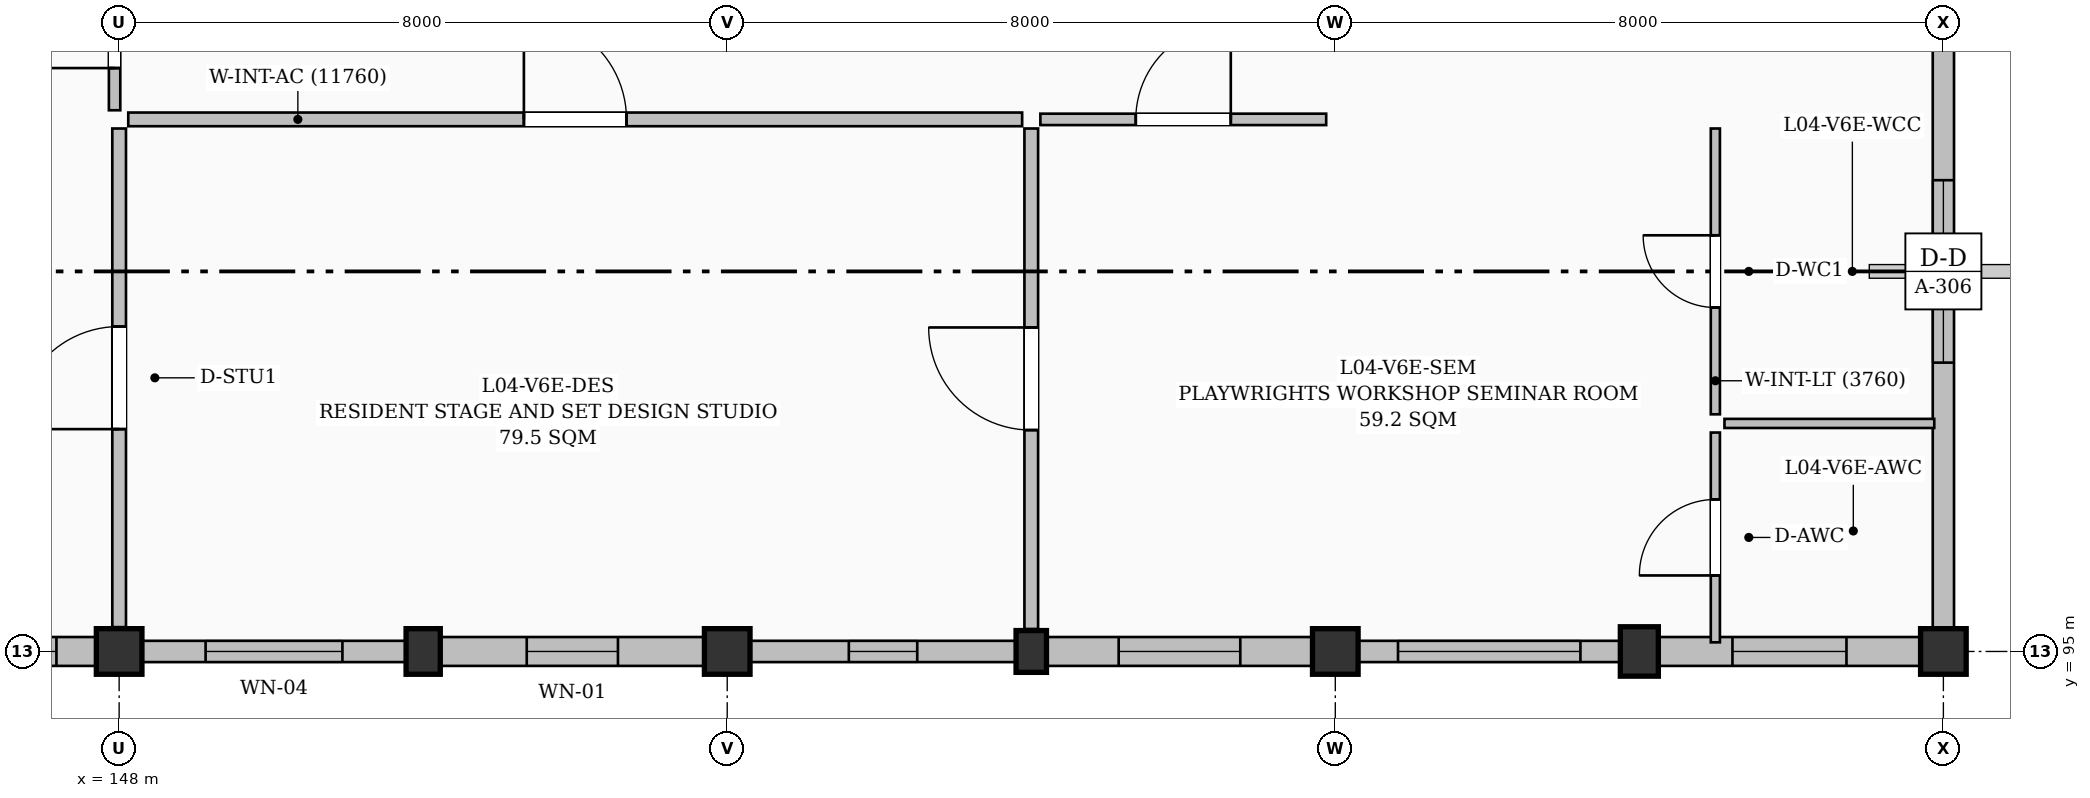
"""IFC4 building model, lengths in metres.
Left out: names, types, materials, properties, quantities, classifications, styles, units other than length and angle.
Written with IfcOpenShell. Run it as: python <this file> out.ifc"""

import sys

from ifc_helpers import new_model, si_unit, direction, frame, frame_2d, origin, origin_2d, place, context, subcontext, project, spatial, rectangle, extrude, element, fill, save


model = new_model("IFC4")
c1 = context("Model", 3, precision=1e-05, world=origin(), true_north=direction((0.0, 1.0)))
c2 = subcontext(c1, "Body", "Model", "MODEL_VIEW")
j1 = project(units=[si_unit("LENGTHUNIT", "METRE"), si_unit("PLANEANGLEUNIT", "RADIAN")], contexts=[c1])
p1 = place(None, origin())
s1 = spatial("IfcSite", under=j1, at=p1, CompositionType="ELEMENT")
p2 = place(p1, origin())
s2 = spatial("IfcBuilding", under=s1, at=p2, CompositionType="ELEMENT")
p3 = place(p2, frame((0.0, 0.0, 18.3)))
s3 = spatial("IfcBuildingStorey", under=s2, at=p3, CompositionType="ELEMENT", Elevation=18.3)
p4 = place(p3, frame((148.0, 95.0, 0.0), z_axis=(0.0, 0.0, 1.0), x_axis=(1.0, 0.0, 0.0)))
e1 = element("IfcColumn", 1, at=p4, inside=s3, PredefinedType="COLUMN", context=c2, shape_type="SweptSolid", body=[
    extrude(rectangle(XDim=0.6, YDim=0.6, at=origin_2d()), origin(), (0.0, 0.0, 1.0), 4.5),
])
p5 = place(p3, frame((152.0, 95.0, 0.0), z_axis=(0.0, 0.0, 1.0), x_axis=(1.0, 0.0, 0.0)))
e2 = element("IfcColumn", 2, at=p5, inside=s3, PredefinedType="PILASTER", context=c2, shape_type="SweptSolid", body=[
    extrude(rectangle(XDim=0.45, YDim=0.6, at=origin_2d()), origin(), (0.0, 0.0, 1.0), 4.5),
])
p6 = place(p3, frame((156.0, 95.0, 0.0), z_axis=(0.0, 0.0, 1.0), x_axis=(1.0, 0.0, 0.0)))
e3 = element("IfcColumn", 3, at=p6, inside=s3, PredefinedType="COLUMN", context=c2, shape_type="SweptSolid", body=[
    extrude(rectangle(XDim=0.6, YDim=0.6, at=origin_2d()), origin(), (0.0, 0.0, 1.0), 4.5),
])
p7 = place(p3, frame((160.0, 95.0, 0.0), z_axis=(0.0, 0.0, 1.0), x_axis=(1.0, 0.0, 0.0)))
e4 = element("IfcColumn", 4, at=p7, inside=s3, PredefinedType="PILASTER", context=c2, shape_type="SweptSolid", body=[
    extrude(rectangle(XDim=0.4, YDim=0.55, at=origin_2d()), origin(), (0.0, 0.0, 1.0), 4.5),
])
p8 = place(p3, frame((164.0, 95.0, 0.0), z_axis=(0.0, 0.0, 1.0), x_axis=(1.0, 0.0, 0.0)))
e5 = element("IfcColumn", 5, at=p8, inside=s3, PredefinedType="COLUMN", context=c2, shape_type="SweptSolid", body=[
    extrude(rectangle(XDim=0.6, YDim=0.6, at=origin_2d()), origin(), (0.0, 0.0, 1.0), 4.5),
])
p9 = place(p3, frame((168.0, 95.0, 0.0), z_axis=(0.0, 0.0, 1.0), x_axis=(1.0, 0.0, 0.0)))
e6 = element("IfcColumn", 6, at=p9, inside=s3, PredefinedType="PILASTER", context=c2, shape_type="SweptSolid", body=[
    extrude(rectangle(XDim=0.5, YDim=0.65, at=origin_2d()), origin(), (0.0, 0.0, 1.0), 4.5),
])
p10 = place(p3, frame((172.0, 95.0, 0.0), z_axis=(0.0, 0.0, 1.0), x_axis=(1.0, 0.0, 0.0)))
e7 = element("IfcColumn", 7, at=p10, inside=s3, PredefinedType="COLUMN", context=c2, shape_type="SweptSolid", body=[
    extrude(rectangle(XDim=0.6, YDim=0.6, at=origin_2d()), origin(), (0.0, 0.0, 1.0), 4.5),
])
p11 = place(p3, frame((172.0, 104.7, 0.0), z_axis=(0.0, 0.0, 1.0), x_axis=(0.0, -1.0, 0.0)))
e8 = element("IfcWall", 8, at=p11, inside=s3, PredefinedType="SOLIDWALL", context=c2, shape_type="SweptSolid", body=[
    extrude(rectangle(XDim=9.4, YDim=0.28, at=frame_2d((4.7, 0.0))), origin(), (0.0, 0.0, 1.0), 3.885),
])
p12 = place(p11, frame((3.5, 0.0, 0.95)))
e9 = element("IfcOpeningElement", 9, at=p12, cuts=e8, PredefinedType="OPENING", context=c2, shape_type="SweptSolid", body=[
    extrude(rectangle(XDim=2.4, YDim=1.5, at=frame_2d((1.2, 0.75))), frame((0.0, 0.15, 0.0), z_axis=(0.0, -1.0, 0.0), x_axis=(1.0, 0.0, 0.0)), (0.0, 0.0, 1.0), 0.3),
])
p13 = place(p3, frame((171.7, 95.0, 0.0), z_axis=(0.0, 0.0, 1.0), x_axis=(-1.0, 0.0, 0.0)))
e10 = element("IfcWall", 10, at=p13, inside=s3, PredefinedType="SOLIDWALL", context=c2, shape_type="SweptSolid", body=[
    extrude(rectangle(XDim=3.45, YDim=0.38, at=frame_2d((1.725, 0.0))), origin(), (0.0, 0.0, 1.0), 3.635),
])
p14 = place(p13, frame((0.975, 0.0, 0.95)))
e11 = element("IfcOpeningElement", 11, at=p14, cuts=e10, PredefinedType="OPENING", context=c2, shape_type="SweptSolid", body=[
    extrude(rectangle(XDim=1.5, YDim=1.5, at=frame_2d((0.75, 0.75))), frame((0.0, 0.2, 0.0), z_axis=(0.0, -1.0, 0.0), x_axis=(1.0, 0.0, 0.0)), (0.0, 0.0, 1.0), 0.4),
])
p15 = place(p3, frame((167.75, 95.0, 0.0), z_axis=(0.0, 0.0, 1.0), x_axis=(-1.0, 0.0, 0.0)))
e12 = element("IfcWall", 12, at=p15, inside=s3, PredefinedType="SOLIDWALL", context=c2, shape_type="SweptSolid", body=[
    extrude(rectangle(XDim=3.45, YDim=0.28, at=frame_2d((1.725, 0.0))), origin(), (0.0, 0.0, 1.0), 3.635),
])
p16 = place(p15, frame((0.525, 0.0, 0.95)))
e13 = element("IfcOpeningElement", 13, at=p16, cuts=e12, PredefinedType="OPENING", context=c2, shape_type="SweptSolid", body=[
    extrude(rectangle(XDim=2.4, YDim=1.5, at=frame_2d((1.2, 0.75))), frame((0.0, 0.15, 0.0), z_axis=(0.0, -1.0, 0.0), x_axis=(1.0, 0.0, 0.0)), (0.0, 0.0, 1.0), 0.3),
])
p17 = place(p3, frame((163.7, 95.0, 0.0), z_axis=(0.0, 0.0, 1.0), x_axis=(-1.0, 0.0, 0.0)))
e14 = element("IfcWall", 14, at=p17, inside=s3, PredefinedType="SOLIDWALL", context=c2, shape_type="SweptSolid", body=[
    extrude(rectangle(XDim=3.5, YDim=0.38, at=frame_2d((1.75, 0.0))), origin(), (0.0, 0.0, 1.0), 3.685),
])
p18 = place(p17, frame((0.95, 0.0, 0.95)))
e15 = element("IfcOpeningElement", 15, at=p18, cuts=e14, PredefinedType="OPENING", context=c2, shape_type="SweptSolid", body=[
    extrude(rectangle(XDim=1.6, YDim=1.2, at=frame_2d((0.8, 0.6))), frame((0.0, 0.2, 0.0), z_axis=(0.0, -1.0, 0.0), x_axis=(1.0, 0.0, 0.0)), (0.0, 0.0, 1.0), 0.4),
])
p19 = place(p3, frame((159.8, 95.0, 0.0), z_axis=(0.0, 0.0, 1.0), x_axis=(-1.0, 0.0, 0.0)))
e16 = element("IfcWall", 16, at=p19, inside=s3, PredefinedType="SOLIDWALL", context=c2, shape_type="SweptSolid", body=[
    extrude(rectangle(XDim=3.5, YDim=0.28, at=frame_2d((1.75, 0.0))), origin(), (0.0, 0.0, 1.0), 3.685),
])
p20 = place(p19, frame((1.3, 0.0, 0.95)))
e17 = element("IfcOpeningElement", 17, at=p20, cuts=e16, PredefinedType="OPENING", context=c2, shape_type="SweptSolid", body=[
    extrude(rectangle(XDim=0.9, YDim=1.8, at=frame_2d((0.45, 0.9))), frame((0.0, 0.15, 0.0), z_axis=(0.0, -1.0, 0.0), x_axis=(1.0, 0.0, 0.0)), (0.0, 0.0, 1.0), 0.3),
])
p21 = place(p3, frame((155.7, 95.0, 0.0), z_axis=(0.0, 0.0, 1.0), x_axis=(-1.0, 0.0, 0.0)))
e18 = element("IfcWall", 18, at=p21, inside=s3, PredefinedType="SOLIDWALL", context=c2, shape_type="SweptSolid", body=[
    extrude(rectangle(XDim=3.475, YDim=0.38, at=frame_2d((1.737, 0.0))), origin(), (0.0, 0.0, 1.0), 3.885),
])
p22 = place(p21, frame((1.137, 0.0, 0.95)))
e19 = element("IfcOpeningElement", 19, at=p22, cuts=e18, PredefinedType="OPENING", context=c2, shape_type="SweptSolid", body=[
    extrude(rectangle(XDim=1.2, YDim=1.8, at=frame_2d((0.6, 0.9))), frame((0.0, 0.2, 0.0), z_axis=(0.0, -1.0, 0.0), x_axis=(1.0, 0.0, 0.0)), (0.0, 0.0, 1.0), 0.4),
])
p23 = place(p3, frame((151.775, 95.0, 0.0), z_axis=(0.0, 0.0, 1.0), x_axis=(-1.0, 0.0, 0.0)))
e20 = element("IfcWall", 20, at=p23, inside=s3, PredefinedType="SOLIDWALL", context=c2, shape_type="SweptSolid", body=[
    extrude(rectangle(XDim=3.475, YDim=0.28, at=frame_2d((1.737, 0.0))), origin(), (0.0, 0.0, 1.0), 3.885),
])
p24 = place(p23, frame((0.837, 0.0, 0.95)))
e21 = element("IfcOpeningElement", 21, at=p24, cuts=e20, PredefinedType="OPENING", context=c2, shape_type="SweptSolid", body=[
    extrude(rectangle(XDim=1.8, YDim=1.8, at=frame_2d((0.9, 0.9))), frame((0.0, 0.15, 0.0), z_axis=(0.0, -1.0, 0.0), x_axis=(1.0, 0.0, 0.0)), (0.0, 0.0, 1.0), 0.3),
])
p25 = place(p3, frame((147.7, 95.0, 0.0), z_axis=(0.0, 0.0, 1.0), x_axis=(-1.0, 0.0, 0.0)))
e22 = element("IfcWall", 22, at=p25, inside=s3, PredefinedType="SOLIDWALL", context=c2, shape_type="SweptSolid", body=[
    extrude(rectangle(XDim=3.45, YDim=0.38, at=frame_2d((1.725, 0.0))), origin(), (0.0, 0.0, 1.0), 3.585),
])
p26 = place(p25, frame((0.525, 0.0, 0.95)))
e23 = element("IfcOpeningElement", 23, at=p26, cuts=e22, PredefinedType="OPENING", context=c2, shape_type="SweptSolid", body=[
    extrude(rectangle(XDim=2.4, YDim=1.8, at=frame_2d((1.2, 0.9))), frame((0.0, 0.2, 0.0), z_axis=(0.0, -1.0, 0.0), x_axis=(1.0, 0.0, 0.0)), (0.0, 0.0, 1.0), 0.4),
])
p27 = place(p3, frame((148.0, 95.32, 0.0), z_axis=(0.0, 0.0, 1.0), x_axis=(0.0, 1.0, 0.0)))
e24 = element("IfcWall", 24, at=p27, inside=s3, PredefinedType="PARTITIONING", context=c2, shape_type="SweptSolid", body=[
    extrude(rectangle(XDim=6.56, YDim=0.18, at=frame_2d((3.28, 0.0))), origin(), (0.0, 0.0, 1.0), 3.335),
])
p28 = place(p27, frame((2.605, 0.0, 0.0)))
e25 = element("IfcOpeningElement", 25, at=p28, cuts=e24, PredefinedType="OPENING", context=c2, shape_type="SweptSolid", body=[
    extrude(rectangle(XDim=1.35, YDim=2.2, at=frame_2d((0.675, 1.1))), frame((0.0, 0.1, 0.0), z_axis=(0.0, -1.0, 0.0), x_axis=(1.0, 0.0, 0.0)), (0.0, 0.0, 1.0), 0.2),
])
p29 = place(p3, frame((147.94, 102.12, 0.0), z_axis=(0.0, 0.0, 1.0), x_axis=(0.0, 1.0, 0.0)))
e26 = element("IfcWall", 26, at=p29, inside=s3, PredefinedType="PARTITIONING", context=c2, shape_type="SweptSolid", body=[
    extrude(rectangle(XDim=2.36, YDim=0.15, at=frame_2d((1.18, 0.0))), origin(), (0.0, 0.0, 1.0), 3.335),
])
p30 = place(p29, frame((0.555, 0.0, 0.0)))
e27 = element("IfcOpeningElement", 27, at=p30, cuts=e26, PredefinedType="OPENING", context=c2, shape_type="SweptSolid", body=[
    extrude(rectangle(XDim=1.25, YDim=2.15, at=frame_2d((0.625, 1.075))), frame((0.0, 0.085, 0.0), z_axis=(0.0, -1.0, 0.0), x_axis=(1.0, 0.0, 0.0)), (0.0, 0.0, 1.0), 0.17),
])
p31 = place(p3, frame((160.0, 95.295, 0.0), z_axis=(0.0, 0.0, 1.0), x_axis=(0.0, 1.0, 0.0)))
e28 = element("IfcWall", 28, at=p31, inside=s3, PredefinedType="PARTITIONING", context=c2, shape_type="SweptSolid", body=[
    extrude(rectangle(XDim=6.585, YDim=0.18, at=frame_2d((3.292, 0.0))), origin(), (0.0, 0.0, 1.0), 4.2),
])
p32 = place(p31, frame((2.617, 0.0, 0.0)))
e29 = element("IfcOpeningElement", 29, at=p32, cuts=e28, PredefinedType="OPENING", context=c2, shape_type="SweptSolid", body=[
    extrude(rectangle(XDim=1.35, YDim=2.2, at=frame_2d((0.675, 1.1))), frame((0.0, 0.1, 0.0), z_axis=(0.0, -1.0, 0.0), x_axis=(1.0, 0.0, 0.0)), (0.0, 0.0, 1.0), 0.2),
])
p33 = place(p3, frame((148.12, 102.0, 0.0), z_axis=(0.0, 0.0, 1.0), x_axis=(1.0, 0.0, 0.0)))
e30 = element("IfcWall", 30, at=p33, inside=s3, PredefinedType="PARTITIONING", context=c2, shape_type="SweptSolid", body=[
    extrude(rectangle(XDim=11.76, YDim=0.18, at=frame_2d((5.88, 0.0))), origin(), (0.0, 0.0, 1.0), 3.785),
])
p34 = place(p33, frame((5.205, 0.0, 0.0)))
e31 = element("IfcOpeningElement", 31, at=p34, cuts=e30, PredefinedType="OPENING", context=c2, shape_type="SweptSolid", body=[
    extrude(rectangle(XDim=1.35, YDim=2.2, at=frame_2d((0.675, 1.1))), frame((0.0, 0.1, 0.0), z_axis=(0.0, -1.0, 0.0), x_axis=(1.0, 0.0, 0.0)), (0.0, 0.0, 1.0), 0.2),
])
p35 = place(p3, frame((160.12, 102.0, 0.0), z_axis=(0.0, 0.0, 1.0), x_axis=(1.0, 0.0, 0.0)))
e32 = element("IfcWall", 32, at=p35, inside=s3, PredefinedType="PARTITIONING", context=c2, shape_type="SweptSolid", body=[
    extrude(rectangle(XDim=3.76, YDim=0.15, at=frame_2d((1.88, 0.0))), origin(), (0.0, 0.0, 1.0), 3.885),
])
p36 = place(p35, frame((1.255, 0.0, 0.0)))
e33 = element("IfcOpeningElement", 33, at=p36, cuts=e32, PredefinedType="OPENING", context=c2, shape_type="SweptSolid", body=[
    extrude(rectangle(XDim=1.25, YDim=2.15, at=frame_2d((0.625, 1.075))), frame((0.0, 0.085, 0.0), z_axis=(0.0, -1.0, 0.0), x_axis=(1.0, 0.0, 0.0)), (0.0, 0.0, 1.0), 0.17),
])
p37 = place(p3, frame((169.0, 95.12, 0.0), z_axis=(0.0, 0.0, 1.0), x_axis=(0.0, 1.0, 0.0)))
e34 = element("IfcWall", 34, at=p37, inside=s3, PredefinedType="PARTITIONING", context=c2, shape_type="SweptSolid", body=[
    extrude(rectangle(XDim=2.76, YDim=0.12, at=frame_2d((1.38, 0.0))), origin(), (0.0, 0.0, 1.0), 4.2),
])
p38 = place(p37, frame((0.88, 0.0, 0.0)))
e35 = element("IfcOpeningElement", 35, at=p38, cuts=e34, PredefinedType="OPENING", context=c2, shape_type="SweptSolid", body=[
    extrude(rectangle(XDim=1.0, YDim=2.1, at=frame_2d((0.5, 1.05))), frame((0.0, 0.07, 0.0), z_axis=(0.0, -1.0, 0.0), x_axis=(1.0, 0.0, 0.0)), (0.0, 0.0, 1.0), 0.14),
])
p39 = place(p3, frame((169.0, 98.12, 0.0), z_axis=(0.0, 0.0, 1.0), x_axis=(0.0, 1.0, 0.0)))
e36 = element("IfcWall", 36, at=p39, inside=s3, PredefinedType="PARTITIONING", context=c2, shape_type="SweptSolid", body=[
    extrude(rectangle(XDim=3.76, YDim=0.12, at=frame_2d((1.88, 0.0))), origin(), (0.0, 0.0, 1.0), 4.2),
])
p40 = place(p39, frame((1.405, 0.0, 0.0)))
e37 = element("IfcOpeningElement", 37, at=p40, cuts=e36, PredefinedType="OPENING", context=c2, shape_type="SweptSolid", body=[
    extrude(rectangle(XDim=0.95, YDim=2.1, at=frame_2d((0.475, 1.05))), frame((0.0, 0.07, 0.0), z_axis=(0.0, -1.0, 0.0), x_axis=(1.0, 0.0, 0.0)), (0.0, 0.0, 1.0), 0.14),
])
p41 = place(p3, frame((169.12, 98.0, 0.0), z_axis=(0.0, 0.0, 1.0), x_axis=(1.0, 0.0, 0.0)))
e38 = element("IfcWall", 38, at=p41, inside=s3, PredefinedType="PARTITIONING", context=c2, shape_type="SweptSolid", body=[
    extrude(rectangle(XDim=2.76, YDim=0.12, at=frame_2d((1.38, 0.0))), origin(), (0.0, 0.0, 1.0), 3.825),
])
p42 = place(p12, origin())
e39 = element("IfcWindow", 39, at=p42, inside=s3, PartitioningType="TRIPLE_PANEL_VERTICAL", PredefinedType="WINDOW", context=c2, shape_type="SweptSolid", body=[
    extrude(rectangle(XDim=2.4, YDim=1.5, at=frame_2d((1.2, 0.75))), frame((0.0, 0.03, 0.0), z_axis=(0.0, -1.0, 0.0), x_axis=(1.0, 0.0, 0.0)), (0.0, 0.0, 1.0), 0.06),
])
fill(e9, e39)
p43 = place(p14, origin())
e40 = element("IfcWindow", 40, at=p43, inside=s3, PartitioningType="DOUBLE_PANEL_VERTICAL", PredefinedType="WINDOW", context=c2, shape_type="SweptSolid", body=[
    extrude(rectangle(XDim=1.5, YDim=1.5, at=frame_2d((0.75, 0.75))), frame((0.0, 0.03, 0.0), z_axis=(0.0, -1.0, 0.0), x_axis=(1.0, 0.0, 0.0)), (0.0, 0.0, 1.0), 0.06),
])
fill(e11, e40)
p44 = place(p16, origin())
e41 = element("IfcWindow", 41, at=p44, inside=s3, PartitioningType="TRIPLE_PANEL_VERTICAL", PredefinedType="WINDOW", context=c2, shape_type="SweptSolid", body=[
    extrude(rectangle(XDim=2.4, YDim=1.5, at=frame_2d((1.2, 0.75))), frame((0.0, 0.03, 0.0), z_axis=(0.0, -1.0, 0.0), x_axis=(1.0, 0.0, 0.0)), (0.0, 0.0, 1.0), 0.06),
])
fill(e13, e41)
p45 = place(p18, origin())
e42 = element("IfcWindow", 42, at=p45, inside=s3, PartitioningType="DOUBLE_PANEL_HORIZONTAL", PredefinedType="WINDOW", context=c2, shape_type="SweptSolid", body=[
    extrude(rectangle(XDim=1.6, YDim=1.2, at=frame_2d((0.8, 0.6))), frame((0.0, 0.03, 0.0), z_axis=(0.0, -1.0, 0.0), x_axis=(1.0, 0.0, 0.0)), (0.0, 0.0, 1.0), 0.06),
])
fill(e15, e42)
p46 = place(p20, origin())
e43 = element("IfcWindow", 43, at=p46, inside=s3, PartitioningType="SINGLE_PANEL", PredefinedType="WINDOW", context=c2, shape_type="SweptSolid", body=[
    extrude(rectangle(XDim=0.9, YDim=1.8, at=frame_2d((0.45, 0.9))), frame((0.0, 0.03, 0.0), z_axis=(0.0, -1.0, 0.0), x_axis=(1.0, 0.0, 0.0)), (0.0, 0.0, 1.0), 0.06),
])
fill(e17, e43)
p47 = place(p22, origin())
e44 = element("IfcWindow", 44, at=p47, inside=s3, PartitioningType="SINGLE_PANEL", PredefinedType="WINDOW", context=c2, shape_type="SweptSolid", body=[
    extrude(rectangle(XDim=1.2, YDim=1.8, at=frame_2d((0.6, 0.9))), frame((0.0, 0.03, 0.0), z_axis=(0.0, -1.0, 0.0), x_axis=(1.0, 0.0, 0.0)), (0.0, 0.0, 1.0), 0.06),
])
fill(e19, e44)
p48 = place(p24, origin())
e45 = element("IfcWindow", 45, at=p48, inside=s3, PartitioningType="DOUBLE_PANEL_VERTICAL", PredefinedType="WINDOW", context=c2, shape_type="SweptSolid", body=[
    extrude(rectangle(XDim=1.8, YDim=1.8, at=frame_2d((0.9, 0.9))), frame((0.0, 0.03, 0.0), z_axis=(0.0, -1.0, 0.0), x_axis=(1.0, 0.0, 0.0)), (0.0, 0.0, 1.0), 0.06),
])
fill(e21, e45)
p49 = place(p26, origin())
e46 = element("IfcWindow", 46, at=p49, inside=s3, PartitioningType="TRIPLE_PANEL_VERTICAL", PredefinedType="WINDOW", context=c2, shape_type="SweptSolid", body=[
    extrude(rectangle(XDim=2.4, YDim=1.8, at=frame_2d((1.2, 0.9))), frame((0.0, 0.03, 0.0), z_axis=(0.0, -1.0, 0.0), x_axis=(1.0, 0.0, 0.0)), (0.0, 0.0, 1.0), 0.06),
])
fill(e23, e46)
p50 = place(p28, origin())
e47 = element("IfcDoor", 47, at=p50, inside=s3, OperationType="SINGLE_SWING_LEFT", PredefinedType="DOOR", context=c2, shape_type="SweptSolid", body=[
    extrude(rectangle(XDim=1.35, YDim=2.2, at=frame_2d((0.675, 1.1))), frame((0.0, 0.025, 0.0), z_axis=(0.0, -1.0, 0.0), x_axis=(1.0, 0.0, 0.0)), (0.0, 0.0, 1.0), 0.05),
])
fill(e25, e47)
p51 = place(p30, origin())
e48 = element("IfcDoor", 48, at=p51, inside=s3, OperationType="SINGLE_SWING_LEFT", PredefinedType="DOOR", context=c2, shape_type="SweptSolid", body=[
    extrude(rectangle(XDim=1.25, YDim=2.15, at=frame_2d((0.625, 1.075))), frame((0.0, 0.025, 0.0), z_axis=(0.0, -1.0, 0.0), x_axis=(1.0, 0.0, 0.0)), (0.0, 0.0, 1.0), 0.05),
])
fill(e27, e48)
p52 = place(p32, origin())
e49 = element("IfcDoor", 49, at=p52, inside=s3, OperationType="SINGLE_SWING_RIGHT", PredefinedType="DOOR", context=c2, shape_type="SweptSolid", body=[
    extrude(rectangle(XDim=1.35, YDim=2.2, at=frame_2d((0.675, 1.1))), frame((0.0, 0.025, 0.0), z_axis=(0.0, -1.0, 0.0), x_axis=(1.0, 0.0, 0.0)), (0.0, 0.0, 1.0), 0.05),
])
fill(e29, e49)
p53 = place(p34, origin())
e50 = element("IfcDoor", 50, at=p53, inside=s3, OperationType="SINGLE_SWING_LEFT", PredefinedType="DOOR", context=c2, shape_type="SweptSolid", body=[
    extrude(rectangle(XDim=1.35, YDim=2.2, at=frame_2d((0.675, 1.1))), frame((0.0, 0.025, 0.0), z_axis=(0.0, -1.0, 0.0), x_axis=(1.0, 0.0, 0.0)), (0.0, 0.0, 1.0), 0.05),
])
fill(e31, e50)
p54 = place(p36, origin())
e51 = element("IfcDoor", 51, at=p54, inside=s3, OperationType="SINGLE_SWING_RIGHT", PredefinedType="DOOR", context=c2, shape_type="SweptSolid", body=[
    extrude(rectangle(XDim=1.25, YDim=2.15, at=frame_2d((0.625, 1.075))), frame((0.0, 0.025, 0.0), z_axis=(0.0, -1.0, 0.0), x_axis=(1.0, 0.0, 0.0)), (0.0, 0.0, 1.0), 0.05),
])
fill(e33, e51)
p55 = place(p38, origin())
e52 = element("IfcDoor", 52, at=p55, inside=s3, OperationType="SINGLE_SWING_LEFT", PredefinedType="DOOR", context=c2, shape_type="SweptSolid", body=[
    extrude(rectangle(XDim=1.0, YDim=2.1, at=frame_2d((0.5, 1.05))), frame((0.0, 0.025, 0.0), z_axis=(0.0, -1.0, 0.0), x_axis=(1.0, 0.0, 0.0)), (0.0, 0.0, 1.0), 0.05),
])
fill(e35, e52)
p56 = place(p40, origin())
e53 = element("IfcDoor", 53, at=p56, inside=s3, OperationType="SINGLE_SWING_RIGHT", PredefinedType="DOOR", context=c2, shape_type="SweptSolid", body=[
    extrude(rectangle(XDim=0.95, YDim=2.1, at=frame_2d((0.475, 1.05))), frame((0.0, 0.025, 0.0), z_axis=(0.0, -1.0, 0.0), x_axis=(1.0, 0.0, 0.0)), (0.0, 0.0, 1.0), 0.05),
])
fill(e37, e53)
save(model, sys.argv[1])
